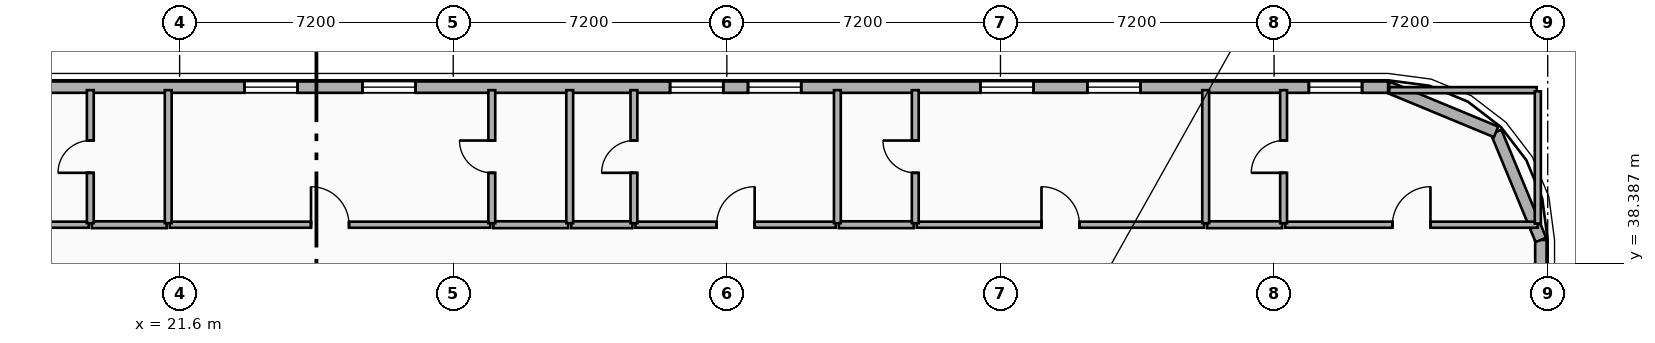
"""IFC4 building model, lengths in metres.
Left out: names, types, materials, properties, quantities, classifications, styles, units other than length and angle.
Written with IfcOpenShell. Run it as: python <this file> out.ifc"""

import sys

from ifc_helpers import new_model, si_unit, direction, frame, frame_2d, origin, place, context, subcontext, project, spatial, rectangle, extrude, element, fill, save


model = new_model("IFC4")
c1 = context("Model", 3, precision=1e-05, world=origin(), true_north=direction((0.0, 1.0)))
c2 = subcontext(c1, "Body", "Model", "MODEL_VIEW")
j1 = project(units=[si_unit("LENGTHUNIT", "METRE"), si_unit("PLANEANGLEUNIT", "RADIAN")], contexts=[c1])
p1 = place(None, origin())
s1 = spatial("IfcSite", under=j1, at=p1, CompositionType="ELEMENT")
p2 = place(p1, origin())
s2 = spatial("IfcBuilding", under=s1, at=p2, CompositionType="ELEMENT")
p3 = place(p2, frame((0.0, 0.0, 79.3)))
s3 = spatial("IfcBuildingStorey", under=s2, at=p3, CompositionType="ELEMENT", Elevation=79.3)
p4 = place(p3, frame((57.42, 39.0, 0.0), z_axis=(0.0, 0.0, 1.0), x_axis=(0.0, -1.0, 0.0)))
e1 = element("IfcWall", 1, at=p4, inside=s3, PredefinedType="SOLIDWALL", context=c2, shape_type="SweptSolid", body=[
    extrude(rectangle(XDim=18.0, YDim=0.3, at=frame_2d((9.0, 0.0))), origin(), (0.0, 0.0, 1.0), 3.24),
])
p5 = place(p4, frame((8.882, 0.0, 0.48)))
e2 = element("IfcOpeningElement", 2, at=p5, cuts=e1, PredefinedType="OPENING", context=c2, shape_type="SweptSolid", body=[
    extrude(rectangle(XDim=1.4, YDim=1.8, at=frame_2d((0.7, 0.9))), frame((0.0, 0.16, 0.0), z_axis=(0.0, -1.0, 0.0), x_axis=(1.0, 0.0, 0.0)), (0.0, 0.0, 1.0), 0.32),
])
p6 = place(p4, frame((3.621, 0.0, 0.48)))
e3 = element("IfcOpeningElement", 3, at=p6, cuts=e1, PredefinedType="OPENING", context=c2, shape_type="SweptSolid", body=[
    extrude(rectangle(XDim=1.4, YDim=1.8, at=frame_2d((0.7, 0.9))), frame((0.0, 0.16, 0.0), z_axis=(0.0, -1.0, 0.0), x_axis=(1.0, 0.0, 0.0)), (0.0, 0.0, 1.0), 0.32),
])
p7 = place(p4, frame((16.28, 0.0, 0.65)))
e4 = element("IfcOpeningElement", 4, at=p7, cuts=e1, PredefinedType="OPENING", context=c2, shape_type="SweptSolid", body=[
    extrude(rectangle(XDim=1.4, YDim=1.8, at=frame_2d((0.7, 0.9))), frame((0.0, 0.16, 0.0), z_axis=(0.0, -1.0, 0.0), x_axis=(1.0, 0.0, 0.0)), (0.0, 0.0, 1.0), 0.32),
])
p8 = place(p3, frame((56.243, 41.843, 0.0), z_axis=(0.0, 0.0, 1.0), x_axis=(0.382636798336, -0.92389884758, 0.0)))
e5 = element("IfcWall", 5, at=p8, inside=s3, PredefinedType="SOLIDWALL", context=c2, shape_type="SweptSolid", body=[
    extrude(rectangle(XDim=3.077, YDim=0.3, at=frame_2d((1.538, 0.0))), origin(), (0.0, 0.0, 1.0), 3.24),
])
p9 = place(p3, frame((53.4, 43.02, 0.0), z_axis=(0.0, 0.0, 1.0), x_axis=(0.923882414032, -0.382676475685, 0.0)))
e6 = element("IfcWall", 6, at=p9, inside=s3, PredefinedType="SOLIDWALL", context=c2, shape_type="SweptSolid", body=[
    extrude(rectangle(XDim=3.077, YDim=0.3, at=frame_2d((1.539, 0.0))), origin(), (0.0, 0.0, 1.0), 3.24),
])
p10 = place(p3, frame((4.2, 43.02, 0.0), z_axis=(0.0, 0.0, 1.0), x_axis=(1.0, 0.0, 0.0)))
e7 = element("IfcWall", 7, at=p10, inside=s3, PredefinedType="SOLIDWALL", context=c2, shape_type="SweptSolid", body=[
    extrude(rectangle(XDim=49.2, YDim=0.3, at=frame_2d((24.6, 0.0))), origin(), (0.0, 0.0, 1.0), 3.24),
])
p11 = place(p10, frame((9.09, 0.0, 0.85)))
e8 = element("IfcOpeningElement", 8, at=p11, cuts=e7, PredefinedType="OPENING", context=c2, shape_type="SweptSolid", body=[
    extrude(rectangle(XDim=1.4, YDim=1.8, at=frame_2d((0.7, 0.9))), frame((0.0, 0.16, 0.0), z_axis=(0.0, -1.0, 0.0), x_axis=(1.0, 0.0, 0.0)), (0.0, 0.0, 1.0), 0.32),
])
p12 = place(p10, frame((11.92, 0.0, 0.85)))
e9 = element("IfcOpeningElement", 9, at=p12, cuts=e7, PredefinedType="OPENING", context=c2, shape_type="SweptSolid", body=[
    extrude(rectangle(XDim=1.4, YDim=1.8, at=frame_2d((0.7, 0.9))), frame((0.0, 0.16, 0.0), z_axis=(0.0, -1.0, 0.0), x_axis=(1.0, 0.0, 0.0)), (0.0, 0.0, 1.0), 0.32),
])
p13 = place(p10, frame((19.105, 0.0, 0.85)))
e10 = element("IfcOpeningElement", 10, at=p13, cuts=e7, PredefinedType="OPENING", context=c2, shape_type="SweptSolid", body=[
    extrude(rectangle(XDim=1.4, YDim=1.8, at=frame_2d((0.7, 0.9))), frame((0.0, 0.16, 0.0), z_axis=(0.0, -1.0, 0.0), x_axis=(1.0, 0.0, 0.0)), (0.0, 0.0, 1.0), 0.32),
])
p14 = place(p10, frame((22.21, 0.0, 0.85)))
e11 = element("IfcOpeningElement", 11, at=p14, cuts=e7, PredefinedType="OPENING", context=c2, shape_type="SweptSolid", body=[
    extrude(rectangle(XDim=1.4, YDim=1.8, at=frame_2d((0.7, 0.9))), frame((0.0, 0.16, 0.0), z_axis=(0.0, -1.0, 0.0), x_axis=(1.0, 0.0, 0.0)), (0.0, 0.0, 1.0), 0.32),
])
p15 = place(p10, frame((30.306, 0.0, 0.85)))
e12 = element("IfcOpeningElement", 12, at=p15, cuts=e7, PredefinedType="OPENING", context=c2, shape_type="SweptSolid", body=[
    extrude(rectangle(XDim=1.4, YDim=1.8, at=frame_2d((0.7, 0.9))), frame((0.0, 0.16, 0.0), z_axis=(0.0, -1.0, 0.0), x_axis=(1.0, 0.0, 0.0)), (0.0, 0.0, 1.0), 0.32),
])
p16 = place(p10, frame((32.357, 0.0, 0.85)))
e13 = element("IfcOpeningElement", 13, at=p16, cuts=e7, PredefinedType="OPENING", context=c2, shape_type="SweptSolid", body=[
    extrude(rectangle(XDim=1.4, YDim=1.8, at=frame_2d((0.7, 0.9))), frame((0.0, 0.16, 0.0), z_axis=(0.0, -1.0, 0.0), x_axis=(1.0, 0.0, 0.0)), (0.0, 0.0, 1.0), 0.32),
])
p17 = place(p10, frame((38.472, 0.0, 0.85)))
e14 = element("IfcOpeningElement", 14, at=p17, cuts=e7, PredefinedType="OPENING", context=c2, shape_type="SweptSolid", body=[
    extrude(rectangle(XDim=1.4, YDim=1.8, at=frame_2d((0.7, 0.9))), frame((0.0, 0.16, 0.0), z_axis=(0.0, -1.0, 0.0), x_axis=(1.0, 0.0, 0.0)), (0.0, 0.0, 1.0), 0.32),
])
p18 = place(p10, frame((41.286, 0.0, 0.85)))
e15 = element("IfcOpeningElement", 15, at=p18, cuts=e7, PredefinedType="OPENING", context=c2, shape_type="SweptSolid", body=[
    extrude(rectangle(XDim=1.4, YDim=1.8, at=frame_2d((0.7, 0.9))), frame((0.0, 0.16, 0.0), z_axis=(0.0, -1.0, 0.0), x_axis=(1.0, 0.0, 0.0)), (0.0, 0.0, 1.0), 0.32),
])
p19 = place(p10, frame((47.115, 0.0, 0.85)))
e16 = element("IfcOpeningElement", 16, at=p19, cuts=e7, PredefinedType="OPENING", context=c2, shape_type="SweptSolid", body=[
    extrude(rectangle(XDim=1.4, YDim=1.8, at=frame_2d((0.7, 0.9))), frame((0.0, 0.16, 0.0), z_axis=(0.0, -1.0, 0.0), x_axis=(1.0, 0.0, 0.0)), (0.0, 0.0, 1.0), 0.32),
])
p20 = place(p3, frame((11.6, 39.4, 0.0), z_axis=(0.0, 0.0, 1.0), x_axis=(1.0, 0.0, 0.0)))
e17 = element("IfcWall", 17, at=p20, inside=s3, PredefinedType="PARTITIONING", context=c2, shape_type="SweptSolid", body=[
    extrude(rectangle(XDim=7.61, YDim=0.16, at=frame_2d((3.805, 0.0))), origin(), (0.0, 0.0, 1.0), 3.24),
])
p21 = place(p20, frame((3.305, 0.0, 0.0)))
e18 = element("IfcOpeningElement", 18, at=p21, cuts=e17, PredefinedType="OPENING", context=c2, shape_type="SweptSolid", body=[
    extrude(rectangle(XDim=1.0, YDim=2.15, at=frame_2d((0.5, 1.075))), frame((0.0, 0.09, 0.0), z_axis=(0.0, -1.0, 0.0), x_axis=(1.0, 0.0, 0.0)), (0.0, 0.0, 1.0), 0.18),
])
p22 = place(p3, frame((19.29, 39.4, 0.0), z_axis=(0.0, 0.0, 1.0), x_axis=(1.0, 0.0, 0.0)))
e19 = element("IfcWall", 19, at=p22, inside=s3, PredefinedType="PLUMBINGWALL", context=c2, shape_type="SweptSolid", body=[
    extrude(rectangle(XDim=1.97, YDim=0.18, at=frame_2d((0.985, 0.0))), origin(), (0.0, 0.0, 1.0), 3.24),
])
p23 = place(p3, frame((21.34, 39.4, 0.0), z_axis=(0.0, 0.0, 1.0), x_axis=(1.0, 0.0, 0.0)))
e20 = element("IfcWall", 20, at=p23, inside=s3, PredefinedType="PARTITIONING", context=c2, shape_type="SweptSolid", body=[
    extrude(rectangle(XDim=8.435, YDim=0.16, at=frame_2d((4.217, 0.0))), origin(), (0.0, 0.0, 1.0), 3.24),
])
p24 = place(p23, frame((3.718, 0.0, 0.0)))
e21 = element("IfcOpeningElement", 21, at=p24, cuts=e20, PredefinedType="OPENING", context=c2, shape_type="SweptSolid", body=[
    extrude(rectangle(XDim=1.0, YDim=2.15, at=frame_2d((0.5, 1.075))), frame((0.0, 0.09, 0.0), z_axis=(0.0, -1.0, 0.0), x_axis=(1.0, 0.0, 0.0)), (0.0, 0.0, 1.0), 0.18),
])
p25 = place(p3, frame((29.855, 39.4, 0.0), z_axis=(0.0, 0.0, 1.0), x_axis=(1.0, 0.0, 0.0)))
e22 = element("IfcWall", 22, at=p25, inside=s3, PredefinedType="PLUMBINGWALL", context=c2, shape_type="SweptSolid", body=[
    extrude(rectangle(XDim=1.97, YDim=0.18, at=frame_2d((0.985, 0.0))), origin(), (0.0, 0.0, 1.0), 3.24),
])
p26 = place(p3, frame((33.595, 39.4, 0.0), z_axis=(0.0, 0.0, 1.0), x_axis=(1.0, 0.0, 0.0)))
e23 = element("IfcWall", 23, at=p26, inside=s3, PredefinedType="PARTITIONING", context=c2, shape_type="SweptSolid", body=[
    extrude(rectangle(XDim=5.273, YDim=0.16, at=frame_2d((2.636, 0.0))), origin(), (0.0, 0.0, 1.0), 3.24),
])
p27 = place(p26, frame((2.136, 0.0, 0.0)))
e24 = element("IfcOpeningElement", 24, at=p27, cuts=e23, PredefinedType="OPENING", context=c2, shape_type="SweptSolid", body=[
    extrude(rectangle(XDim=1.0, YDim=2.15, at=frame_2d((0.5, 1.075))), frame((0.0, 0.09, 0.0), z_axis=(0.0, -1.0, 0.0), x_axis=(1.0, 0.0, 0.0)), (0.0, 0.0, 1.0), 0.18),
])
p28 = place(p3, frame((31.905, 39.4, 0.0), z_axis=(0.0, 0.0, 1.0), x_axis=(1.0, 0.0, 0.0)))
e25 = element("IfcWall", 25, at=p28, inside=s3, PredefinedType="PLUMBINGWALL", context=c2, shape_type="SweptSolid", body=[
    extrude(rectangle(XDim=1.61, YDim=0.18, at=frame_2d((0.805, 0.0))), origin(), (0.0, 0.0, 1.0), 3.24),
])
p29 = place(p3, frame((40.998, 39.4, 0.0), z_axis=(0.0, 0.0, 1.0), x_axis=(1.0, 0.0, 0.0)))
e26 = element("IfcWall", 26, at=p29, inside=s3, PredefinedType="PARTITIONING", context=c2, shape_type="SweptSolid", body=[
    extrude(rectangle(XDim=7.562, YDim=0.16, at=frame_2d((3.781, 0.0))), origin(), (0.0, 0.0, 1.0), 3.24),
])
p30 = place(p29, frame((3.281, 0.0, 0.0)))
e27 = element("IfcOpeningElement", 27, at=p30, cuts=e26, PredefinedType="OPENING", context=c2, shape_type="SweptSolid", body=[
    extrude(rectangle(XDim=1.0, YDim=2.15, at=frame_2d((0.5, 1.075))), frame((0.0, 0.09, 0.0), z_axis=(0.0, -1.0, 0.0), x_axis=(1.0, 0.0, 0.0)), (0.0, 0.0, 1.0), 0.18),
])
p31 = place(p3, frame((38.948, 39.4, 0.0), z_axis=(0.0, 0.0, 1.0), x_axis=(1.0, 0.0, 0.0)))
e28 = element("IfcWall", 28, at=p31, inside=s3, PredefinedType="PLUMBINGWALL", context=c2, shape_type="SweptSolid", body=[
    extrude(rectangle(XDim=1.97, YDim=0.18, at=frame_2d((0.985, 0.0))), origin(), (0.0, 0.0, 1.0), 3.24),
])
p32 = place(p3, frame((50.69, 39.4, 0.0), z_axis=(0.0, 0.0, 1.0), x_axis=(1.0, 0.0, 0.0)))
e29 = element("IfcWall", 29, at=p32, inside=s3, PredefinedType="PARTITIONING", context=c2, shape_type="SweptSolid", body=[
    extrude(rectangle(XDim=6.65, YDim=0.16, at=frame_2d((3.325, 0.0))), origin(), (0.0, 0.0, 1.0), 3.24),
])
p33 = place(p32, frame((2.825, 0.0, 0.0)))
e30 = element("IfcOpeningElement", 30, at=p33, cuts=e29, PredefinedType="OPENING", context=c2, shape_type="SweptSolid", body=[
    extrude(rectangle(XDim=1.0, YDim=2.15, at=frame_2d((0.5, 1.075))), frame((0.0, 0.09, 0.0), z_axis=(0.0, -1.0, 0.0), x_axis=(1.0, 0.0, 0.0)), (0.0, 0.0, 1.0), 0.18),
])
p34 = place(p3, frame((48.64, 39.4, 0.0), z_axis=(0.0, 0.0, 1.0), x_axis=(1.0, 0.0, 0.0)))
e31 = element("IfcWall", 31, at=p34, inside=s3, PredefinedType="PLUMBINGWALL", context=c2, shape_type="SweptSolid", body=[
    extrude(rectangle(XDim=1.97, YDim=0.18, at=frame_2d((0.985, 0.0))), origin(), (0.0, 0.0, 1.0), 3.24),
])
p35 = place(p3, frame((19.25, 39.44, 0.0), z_axis=(0.0, 0.0, 1.0), x_axis=(0.0, 1.0, 0.0)))
e32 = element("IfcWall", 32, at=p35, inside=s3, PredefinedType="PLUMBINGWALL", context=c2, shape_type="SweptSolid", body=[
    extrude(rectangle(XDim=3.5, YDim=0.18, at=frame_2d((1.75, 0.0))), origin(), (0.0, 0.0, 1.0), 3.24),
])
p36 = place(p35, frame((1.325, 0.0, 0.0)))
e33 = element("IfcOpeningElement", 33, at=p36, cuts=e32, PredefinedType="OPENING", context=c2, shape_type="SweptSolid", body=[
    extrude(rectangle(XDim=0.85, YDim=2.1, at=frame_2d((0.425, 1.05))), frame((0.0, 0.1, 0.0), z_axis=(0.0, -1.0, 0.0), x_axis=(1.0, 0.0, 0.0)), (0.0, 0.0, 1.0), 0.2),
])
p37 = place(p3, frame((21.3, 39.44, 0.0), z_axis=(0.0, 0.0, 1.0), x_axis=(0.0, 1.0, 0.0)))
e34 = element("IfcWall", 34, at=p37, inside=s3, PredefinedType="PLUMBINGWALL", context=c2, shape_type="SweptSolid", body=[
    extrude(rectangle(XDim=3.5, YDim=0.18, at=frame_2d((1.75, 0.0))), origin(), (0.0, 0.0, 1.0), 3.24),
])
p38 = place(p3, frame((29.815, 39.44, 0.0), z_axis=(0.0, 0.0, 1.0), x_axis=(0.0, 1.0, 0.0)))
e35 = element("IfcWall", 35, at=p38, inside=s3, PredefinedType="PLUMBINGWALL", context=c2, shape_type="SweptSolid", body=[
    extrude(rectangle(XDim=3.5, YDim=0.18, at=frame_2d((1.75, 0.0))), origin(), (0.0, 0.0, 1.0), 3.24),
])
p39 = place(p38, frame((1.325, 0.0, 0.0)))
e36 = element("IfcOpeningElement", 36, at=p39, cuts=e35, PredefinedType="OPENING", context=c2, shape_type="SweptSolid", body=[
    extrude(rectangle(XDim=0.85, YDim=2.1, at=frame_2d((0.425, 1.05))), frame((0.0, 0.1, 0.0), z_axis=(0.0, -1.0, 0.0), x_axis=(1.0, 0.0, 0.0)), (0.0, 0.0, 1.0), 0.2),
])
p40 = place(p3, frame((31.865, 39.44, 0.0), z_axis=(0.0, 0.0, 1.0), x_axis=(0.0, 1.0, 0.0)))
e37 = element("IfcWall", 37, at=p40, inside=s3, PredefinedType="PLUMBINGWALL", context=c2, shape_type="SweptSolid", body=[
    extrude(rectangle(XDim=3.5, YDim=0.18, at=frame_2d((1.75, 0.0))), origin(), (0.0, 0.0, 1.0), 3.24),
])
p41 = place(p3, frame((33.555, 39.44, 0.0), z_axis=(0.0, 0.0, 1.0), x_axis=(0.0, 1.0, 0.0)))
e38 = element("IfcWall", 38, at=p41, inside=s3, PredefinedType="PLUMBINGWALL", context=c2, shape_type="SweptSolid", body=[
    extrude(rectangle(XDim=3.5, YDim=0.18, at=frame_2d((1.75, 0.0))), origin(), (0.0, 0.0, 1.0), 3.24),
])
p42 = place(p41, frame((1.325, 0.0, 0.0)))
e39 = element("IfcOpeningElement", 39, at=p42, cuts=e38, PredefinedType="OPENING", context=c2, shape_type="SweptSolid", body=[
    extrude(rectangle(XDim=0.85, YDim=2.1, at=frame_2d((0.425, 1.05))), frame((0.0, 0.1, 0.0), z_axis=(0.0, -1.0, 0.0), x_axis=(1.0, 0.0, 0.0)), (0.0, 0.0, 1.0), 0.2),
])
p43 = place(p3, frame((38.908, 39.44, 0.0), z_axis=(0.0, 0.0, 1.0), x_axis=(0.0, 1.0, 0.0)))
e40 = element("IfcWall", 40, at=p43, inside=s3, PredefinedType="PLUMBINGWALL", context=c2, shape_type="SweptSolid", body=[
    extrude(rectangle(XDim=3.5, YDim=0.18, at=frame_2d((1.75, 0.0))), origin(), (0.0, 0.0, 1.0), 3.24),
])
p44 = place(p3, frame((40.958, 39.44, 0.0), z_axis=(0.0, 0.0, 1.0), x_axis=(0.0, 1.0, 0.0)))
e41 = element("IfcWall", 41, at=p44, inside=s3, PredefinedType="PLUMBINGWALL", context=c2, shape_type="SweptSolid", body=[
    extrude(rectangle(XDim=3.5, YDim=0.18, at=frame_2d((1.75, 0.0))), origin(), (0.0, 0.0, 1.0), 3.24),
])
p45 = place(p44, frame((1.325, 0.0, 0.0)))
e42 = element("IfcOpeningElement", 42, at=p45, cuts=e41, PredefinedType="OPENING", context=c2, shape_type="SweptSolid", body=[
    extrude(rectangle(XDim=0.85, YDim=2.1, at=frame_2d((0.425, 1.05))), frame((0.0, 0.1, 0.0), z_axis=(0.0, -1.0, 0.0), x_axis=(1.0, 0.0, 0.0)), (0.0, 0.0, 1.0), 0.2),
])
p46 = place(p3, frame((48.6, 39.44, 0.0), z_axis=(0.0, 0.0, 1.0), x_axis=(0.0, 1.0, 0.0)))
e43 = element("IfcWall", 43, at=p46, inside=s3, PredefinedType="PLUMBINGWALL", context=c2, shape_type="SweptSolid", body=[
    extrude(rectangle(XDim=3.5, YDim=0.18, at=frame_2d((1.75, 0.0))), origin(), (0.0, 0.0, 1.0), 3.24),
])
p47 = place(p3, frame((50.65, 39.44, 0.0), z_axis=(0.0, 0.0, 1.0), x_axis=(0.0, 1.0, 0.0)))
e44 = element("IfcWall", 44, at=p47, inside=s3, PredefinedType="PLUMBINGWALL", context=c2, shape_type="SweptSolid", body=[
    extrude(rectangle(XDim=3.5, YDim=0.18, at=frame_2d((1.75, 0.0))), origin(), (0.0, 0.0, 1.0), 3.24),
])
p48 = place(p47, frame((1.325, 0.0, 0.0)))
e45 = element("IfcOpeningElement", 45, at=p48, cuts=e44, PredefinedType="OPENING", context=c2, shape_type="SweptSolid", body=[
    extrude(rectangle(XDim=0.85, YDim=2.1, at=frame_2d((0.425, 1.05))), frame((0.0, 0.1, 0.0), z_axis=(0.0, -1.0, 0.0), x_axis=(1.0, 0.0, 0.0)), (0.0, 0.0, 1.0), 0.2),
])
p49 = place(p3, frame((53.43, 42.94, 0.0), z_axis=(0.0, 0.0, 1.0), x_axis=(1.0, 0.0, 0.0)))
e46 = element("IfcWall", 46, at=p49, inside=s3, PredefinedType="PARTITIONING", context=c2, shape_type="SweptSolid", body=[
    extrude(rectangle(XDim=3.88, YDim=0.16, at=frame_2d((1.94, 0.0))), origin(), (0.0, 0.0, 1.0), 3.24),
])
p50 = place(p3, frame((57.34, 39.43, 0.0), z_axis=(0.0, 0.0, 1.0), x_axis=(0.0, 1.0, 0.0)))
e47 = element("IfcWall", 47, at=p50, inside=s3, PredefinedType="PARTITIONING", context=c2, shape_type="SweptSolid", body=[
    extrude(rectangle(XDim=3.48, YDim=0.16, at=frame_2d((1.74, 0.0))), origin(), (0.0, 0.0, 1.0), 3.24),
])
p51 = place(p13, origin())
e48 = element("IfcWindow", 48, at=p51, inside=s3, PartitioningType="SINGLE_PANEL", PredefinedType="WINDOW", context=c2, shape_type="SweptSolid", body=[
    extrude(rectangle(XDim=1.4, YDim=1.8, at=frame_2d((0.7, 0.9))), frame((0.0, 0.03, 0.0), z_axis=(0.0, -1.0, 0.0), x_axis=(1.0, 0.0, 0.0)), (0.0, 0.0, 1.0), 0.06),
])
fill(e10, e48)
p52 = place(p14, origin())
e49 = element("IfcWindow", 49, at=p52, inside=s3, PartitioningType="SINGLE_PANEL", PredefinedType="WINDOW", context=c2, shape_type="SweptSolid", body=[
    extrude(rectangle(XDim=1.4, YDim=1.8, at=frame_2d((0.7, 0.9))), frame((0.0, 0.03, 0.0), z_axis=(0.0, -1.0, 0.0), x_axis=(1.0, 0.0, 0.0)), (0.0, 0.0, 1.0), 0.06),
])
fill(e11, e49)
p53 = place(p15, origin())
e50 = element("IfcWindow", 50, at=p53, inside=s3, PartitioningType="SINGLE_PANEL", PredefinedType="WINDOW", context=c2, shape_type="SweptSolid", body=[
    extrude(rectangle(XDim=1.4, YDim=1.8, at=frame_2d((0.7, 0.9))), frame((0.0, 0.03, 0.0), z_axis=(0.0, -1.0, 0.0), x_axis=(1.0, 0.0, 0.0)), (0.0, 0.0, 1.0), 0.06),
])
fill(e12, e50)
p54 = place(p16, origin())
e51 = element("IfcWindow", 51, at=p54, inside=s3, PartitioningType="SINGLE_PANEL", PredefinedType="WINDOW", context=c2, shape_type="SweptSolid", body=[
    extrude(rectangle(XDim=1.4, YDim=1.8, at=frame_2d((0.7, 0.9))), frame((0.0, 0.03, 0.0), z_axis=(0.0, -1.0, 0.0), x_axis=(1.0, 0.0, 0.0)), (0.0, 0.0, 1.0), 0.06),
])
fill(e13, e51)
p55 = place(p17, origin())
e52 = element("IfcWindow", 52, at=p55, inside=s3, PartitioningType="SINGLE_PANEL", PredefinedType="WINDOW", context=c2, shape_type="SweptSolid", body=[
    extrude(rectangle(XDim=1.4, YDim=1.8, at=frame_2d((0.7, 0.9))), frame((0.0, 0.03, 0.0), z_axis=(0.0, -1.0, 0.0), x_axis=(1.0, 0.0, 0.0)), (0.0, 0.0, 1.0), 0.06),
])
fill(e14, e52)
p56 = place(p18, origin())
e53 = element("IfcWindow", 53, at=p56, inside=s3, PartitioningType="SINGLE_PANEL", PredefinedType="WINDOW", context=c2, shape_type="SweptSolid", body=[
    extrude(rectangle(XDim=1.4, YDim=1.8, at=frame_2d((0.7, 0.9))), frame((0.0, 0.03, 0.0), z_axis=(0.0, -1.0, 0.0), x_axis=(1.0, 0.0, 0.0)), (0.0, 0.0, 1.0), 0.06),
])
fill(e15, e53)
p57 = place(p19, origin())
e54 = element("IfcWindow", 54, at=p57, inside=s3, PartitioningType="SINGLE_PANEL", PredefinedType="WINDOW", context=c2, shape_type="SweptSolid", body=[
    extrude(rectangle(XDim=1.4, YDim=1.8, at=frame_2d((0.7, 0.9))), frame((0.0, 0.03, 0.0), z_axis=(0.0, -1.0, 0.0), x_axis=(1.0, 0.0, 0.0)), (0.0, 0.0, 1.0), 0.06),
])
fill(e16, e54)
p58 = place(p24, origin())
e55 = element("IfcDoor", 55, at=p58, inside=s3, OperationType="SINGLE_SWING_LEFT", PredefinedType="DOOR", context=c2, shape_type="SweptSolid", body=[
    extrude(rectangle(XDim=1.0, YDim=2.15, at=frame_2d((0.5, 1.075))), frame((0.0, 0.025, 0.0), z_axis=(0.0, -1.0, 0.0), x_axis=(1.0, 0.0, 0.0)), (0.0, 0.0, 1.0), 0.05),
])
fill(e21, e55)
p59 = place(p27, origin())
e56 = element("IfcDoor", 56, at=p59, inside=s3, OperationType="SINGLE_SWING_RIGHT", PredefinedType="DOOR", context=c2, shape_type="SweptSolid", body=[
    extrude(rectangle(XDim=1.0, YDim=2.15, at=frame_2d((0.5, 1.075))), frame((0.0, 0.025, 0.0), z_axis=(0.0, -1.0, 0.0), x_axis=(1.0, 0.0, 0.0)), (0.0, 0.0, 1.0), 0.05),
])
fill(e24, e56)
p60 = place(p30, origin())
e57 = element("IfcDoor", 57, at=p60, inside=s3, OperationType="SINGLE_SWING_LEFT", PredefinedType="DOOR", context=c2, shape_type="SweptSolid", body=[
    extrude(rectangle(XDim=1.0, YDim=2.15, at=frame_2d((0.5, 1.075))), frame((0.0, 0.025, 0.0), z_axis=(0.0, -1.0, 0.0), x_axis=(1.0, 0.0, 0.0)), (0.0, 0.0, 1.0), 0.05),
])
fill(e27, e57)
p61 = place(p33, origin())
e58 = element("IfcDoor", 58, at=p61, inside=s3, OperationType="SINGLE_SWING_RIGHT", PredefinedType="DOOR", context=c2, shape_type="SweptSolid", body=[
    extrude(rectangle(XDim=1.0, YDim=2.15, at=frame_2d((0.5, 1.075))), frame((0.0, 0.025, 0.0), z_axis=(0.0, -1.0, 0.0), x_axis=(1.0, 0.0, 0.0)), (0.0, 0.0, 1.0), 0.05),
])
fill(e30, e58)
p62 = place(p36, origin())
e59 = element("IfcDoor", 59, at=p62, inside=s3, OperationType="SINGLE_SWING_LEFT", PredefinedType="DOOR", context=c2, shape_type="SweptSolid", body=[
    extrude(rectangle(XDim=0.85, YDim=2.1, at=frame_2d((0.425, 1.05))), frame((0.0, 0.025, 0.0), z_axis=(0.0, -1.0, 0.0), x_axis=(1.0, 0.0, 0.0)), (0.0, 0.0, 1.0), 0.05),
])
fill(e33, e59)
p63 = place(p39, origin())
e60 = element("IfcDoor", 60, at=p63, inside=s3, OperationType="SINGLE_SWING_RIGHT", PredefinedType="DOOR", context=c2, shape_type="SweptSolid", body=[
    extrude(rectangle(XDim=0.85, YDim=2.1, at=frame_2d((0.425, 1.05))), frame((0.0, 0.025, 0.0), z_axis=(0.0, -1.0, 0.0), x_axis=(1.0, 0.0, 0.0)), (0.0, 0.0, 1.0), 0.05),
])
fill(e36, e60)
p64 = place(p42, origin())
e61 = element("IfcDoor", 61, at=p64, inside=s3, OperationType="SINGLE_SWING_LEFT", PredefinedType="DOOR", context=c2, shape_type="SweptSolid", body=[
    extrude(rectangle(XDim=0.85, YDim=2.1, at=frame_2d((0.425, 1.05))), frame((0.0, 0.025, 0.0), z_axis=(0.0, -1.0, 0.0), x_axis=(1.0, 0.0, 0.0)), (0.0, 0.0, 1.0), 0.05),
])
fill(e39, e61)
p65 = place(p45, origin())
e62 = element("IfcDoor", 62, at=p65, inside=s3, OperationType="SINGLE_SWING_RIGHT", PredefinedType="DOOR", context=c2, shape_type="SweptSolid", body=[
    extrude(rectangle(XDim=0.85, YDim=2.1, at=frame_2d((0.425, 1.05))), frame((0.0, 0.025, 0.0), z_axis=(0.0, -1.0, 0.0), x_axis=(1.0, 0.0, 0.0)), (0.0, 0.0, 1.0), 0.05),
])
fill(e42, e62)
p66 = place(p48, origin())
e63 = element("IfcDoor", 63, at=p66, inside=s3, OperationType="SINGLE_SWING_LEFT", PredefinedType="DOOR", context=c2, shape_type="SweptSolid", body=[
    extrude(rectangle(XDim=0.85, YDim=2.1, at=frame_2d((0.425, 1.05))), frame((0.0, 0.025, 0.0), z_axis=(0.0, -1.0, 0.0), x_axis=(1.0, 0.0, 0.0)), (0.0, 0.0, 1.0), 0.05),
])
fill(e45, e63)
save(model, sys.argv[1])
